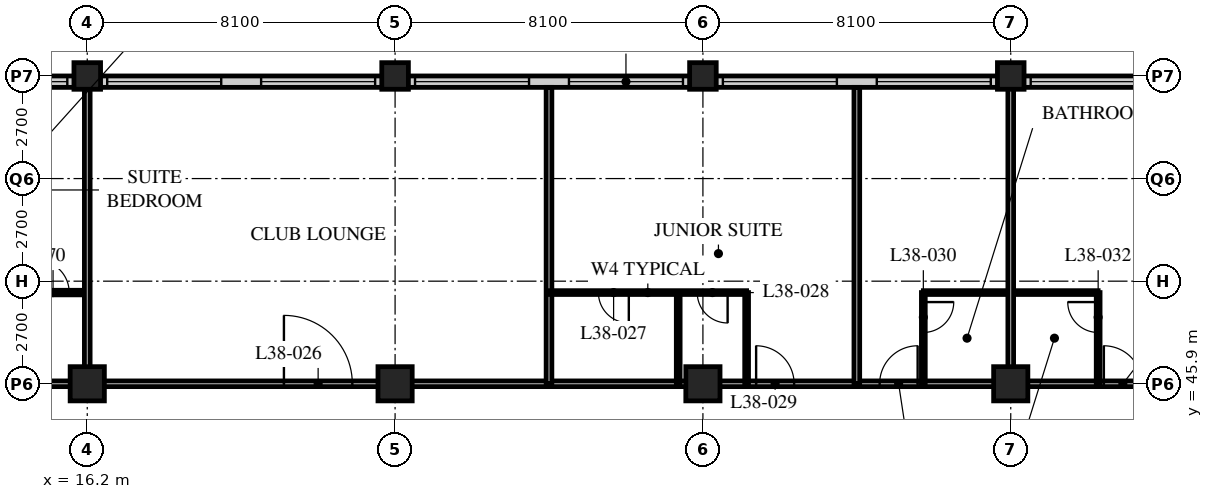
"""IFC4 building model, lengths in metres.
Left out: names, types, materials, properties, quantities, classifications, styles, units other than length and angle.
Written with IfcOpenShell. Run it as: python <this file> out.ifc"""

import sys

from ifc_helpers import new_model, si_unit, direction, frame, frame_2d, origin, origin_2d, place, context, subcontext, project, spatial, rectangle, hollow_rectangle, extrude, element, fill, save


model = new_model("IFC4")
c1 = context("Model", 3, precision=1e-05, world=origin(), true_north=direction((0.0, 1.0)))
c2 = subcontext(c1, "Body", "Model", "MODEL_VIEW")
j1 = project(units=[si_unit("LENGTHUNIT", "METRE"), si_unit("PLANEANGLEUNIT", "RADIAN")], contexts=[c1])
p1 = place(None, origin())
s1 = spatial("IfcSite", under=j1, at=p1, CompositionType="ELEMENT")
p2 = place(p1, origin())
s2 = spatial("IfcBuilding", under=s1, at=p2, CompositionType="ELEMENT")
p3 = place(p2, frame((0.0, 0.0, 147.6)))
s3 = spatial("IfcBuildingStorey", under=s2, at=p3, CompositionType="ELEMENT", Elevation=147.6)
p4 = place(p3, frame((16.2, 45.9, 0.0), z_axis=(0.0, 0.0, 1.0), x_axis=(1.0, 0.0, 0.0)))
e1 = element("IfcColumn", 1, at=p4, inside=s3, PredefinedType="COLUMN", context=c2, shape_type="SweptSolid", body=[
    extrude(hollow_rectangle(XDim=0.9, YDim=0.9, WallThickness=0.1, at=origin_2d()), origin(), (0.0, 0.0, 1.0), 3.4),
])
p5 = place(p3, frame((16.2, 54.0, 0.0), z_axis=(0.0, 0.0, 1.0), x_axis=(1.0, 0.0, 0.0)))
e2 = element("IfcColumn", 2, at=p5, inside=s3, PredefinedType="COLUMN", context=c2, shape_type="SweptSolid", body=[
    extrude(hollow_rectangle(XDim=0.7, YDim=0.7, WallThickness=0.07, at=origin_2d()), origin(), (0.0, 0.0, 1.0), 3.4),
])
p6 = place(p3, frame((24.3, 45.9, 0.0), z_axis=(0.0, 0.0, 1.0), x_axis=(1.0, 0.0, 0.0)))
e3 = element("IfcColumn", 3, at=p6, inside=s3, PredefinedType="COLUMN", context=c2, shape_type="SweptSolid", body=[
    extrude(hollow_rectangle(XDim=0.9, YDim=0.9, WallThickness=0.1, at=origin_2d()), origin(), (0.0, 0.0, 1.0), 3.4),
])
p7 = place(p3, frame((24.3, 54.0, 0.0), z_axis=(0.0, 0.0, 1.0), x_axis=(1.0, 0.0, 0.0)))
e4 = element("IfcColumn", 4, at=p7, inside=s3, PredefinedType="COLUMN", context=c2, shape_type="SweptSolid", body=[
    extrude(hollow_rectangle(XDim=0.7, YDim=0.7, WallThickness=0.07, at=origin_2d()), origin(), (0.0, 0.0, 1.0), 3.4),
])
p8 = place(p3, frame((32.4, 45.9, 0.0), z_axis=(0.0, 0.0, 1.0), x_axis=(1.0, 0.0, 0.0)))
e5 = element("IfcColumn", 5, at=p8, inside=s3, PredefinedType="COLUMN", context=c2, shape_type="SweptSolid", body=[
    extrude(hollow_rectangle(XDim=0.9, YDim=0.9, WallThickness=0.1, at=origin_2d()), origin(), (0.0, 0.0, 1.0), 3.4),
])
p9 = place(p3, frame((32.4, 54.0, 0.0), z_axis=(0.0, 0.0, 1.0), x_axis=(1.0, 0.0, 0.0)))
e6 = element("IfcColumn", 6, at=p9, inside=s3, PredefinedType="COLUMN", context=c2, shape_type="SweptSolid", body=[
    extrude(hollow_rectangle(XDim=0.7, YDim=0.7, WallThickness=0.07, at=origin_2d()), origin(), (0.0, 0.0, 1.0), 3.4),
])
p10 = place(p3, frame((40.5, 45.9, 0.0), z_axis=(0.0, 0.0, 1.0), x_axis=(1.0, 0.0, 0.0)))
e7 = element("IfcColumn", 7, at=p10, inside=s3, PredefinedType="COLUMN", context=c2, shape_type="SweptSolid", body=[
    extrude(hollow_rectangle(XDim=0.9, YDim=0.9, WallThickness=0.1, at=origin_2d()), origin(), (0.0, 0.0, 1.0), 3.4),
])
p11 = place(p3, frame((40.5, 54.0, 0.0), z_axis=(0.0, 0.0, 1.0), x_axis=(1.0, 0.0, 0.0)))
e8 = element("IfcColumn", 8, at=p11, inside=s3, PredefinedType="COLUMN", context=c2, shape_type="SweptSolid", body=[
    extrude(hollow_rectangle(XDim=0.7, YDim=0.7, WallThickness=0.07, at=origin_2d()), origin(), (0.0, 0.0, 1.0), 3.4),
])
p12 = place(p3, frame((48.3, 53.85, 0.0), z_axis=(0.0, 0.0, 1.0), x_axis=(-1.0, 0.0, 0.0)))
e9 = element("IfcWall", 9, at=p12, inside=s3, PredefinedType="SOLIDWALL", context=c2, shape_type="SweptSolid", body=[
    extrude(rectangle(XDim=40.2, YDim=0.3, at=frame_2d((20.1, 0.0))), origin(), (0.0, 0.0, 1.0), 3.19),
])
p13 = place(p12, frame((0.225, 0.0, 0.9)))
e10 = element("IfcOpeningElement", 10, at=p13, cuts=e9, PredefinedType="OPENING", context=c2, shape_type="SweptSolid", body=[
    extrude(rectangle(XDim=3.0, YDim=1.4, at=frame_2d((1.5, 0.7))), frame((0.0, 0.16, 0.0), z_axis=(0.0, -1.0, 0.0), x_axis=(1.0, 0.0, 0.0)), (0.0, 0.0, 1.0), 0.32),
])
p14 = place(p12, frame((4.275, 0.0, 0.9)))
e11 = element("IfcOpeningElement", 11, at=p14, cuts=e9, PredefinedType="OPENING", context=c2, shape_type="SweptSolid", body=[
    extrude(rectangle(XDim=3.0, YDim=1.4, at=frame_2d((1.5, 0.7))), frame((0.0, 0.16, 0.0), z_axis=(0.0, -1.0, 0.0), x_axis=(1.0, 0.0, 0.0)), (0.0, 0.0, 1.0), 0.32),
])
p15 = place(p12, frame((8.325, 0.0, 0.9)))
e12 = element("IfcOpeningElement", 12, at=p15, cuts=e9, PredefinedType="OPENING", context=c2, shape_type="SweptSolid", body=[
    extrude(rectangle(XDim=3.0, YDim=1.4, at=frame_2d((1.5, 0.7))), frame((0.0, 0.16, 0.0), z_axis=(0.0, -1.0, 0.0), x_axis=(1.0, 0.0, 0.0)), (0.0, 0.0, 1.0), 0.32),
])
p16 = place(p12, frame((12.375, 0.0, 0.9)))
e13 = element("IfcOpeningElement", 13, at=p16, cuts=e9, PredefinedType="OPENING", context=c2, shape_type="SweptSolid", body=[
    extrude(rectangle(XDim=3.0, YDim=1.4, at=frame_2d((1.5, 0.7))), frame((0.0, 0.16, 0.0), z_axis=(0.0, -1.0, 0.0), x_axis=(1.0, 0.0, 0.0)), (0.0, 0.0, 1.0), 0.32),
])
p17 = place(p12, frame((16.425, 0.0, 0.9)))
e14 = element("IfcOpeningElement", 14, at=p17, cuts=e9, PredefinedType="OPENING", context=c2, shape_type="SweptSolid", body=[
    extrude(rectangle(XDim=3.0, YDim=1.4, at=frame_2d((1.5, 0.7))), frame((0.0, 0.16, 0.0), z_axis=(0.0, -1.0, 0.0), x_axis=(1.0, 0.0, 0.0)), (0.0, 0.0, 1.0), 0.32),
])
p18 = place(p12, frame((20.475, 0.0, 0.9)))
e15 = element("IfcOpeningElement", 15, at=p18, cuts=e9, PredefinedType="OPENING", context=c2, shape_type="SweptSolid", body=[
    extrude(rectangle(XDim=3.0, YDim=1.4, at=frame_2d((1.5, 0.7))), frame((0.0, 0.16, 0.0), z_axis=(0.0, -1.0, 0.0), x_axis=(1.0, 0.0, 0.0)), (0.0, 0.0, 1.0), 0.32),
])
p19 = place(p12, frame((24.525, 0.0, 0.9)))
e16 = element("IfcOpeningElement", 16, at=p19, cuts=e9, PredefinedType="OPENING", context=c2, shape_type="SweptSolid", body=[
    extrude(rectangle(XDim=3.0, YDim=1.4, at=frame_2d((1.5, 0.7))), frame((0.0, 0.16, 0.0), z_axis=(0.0, -1.0, 0.0), x_axis=(1.0, 0.0, 0.0)), (0.0, 0.0, 1.0), 0.32),
])
p20 = place(p12, frame((28.575, 0.0, 0.9)))
e17 = element("IfcOpeningElement", 17, at=p20, cuts=e9, PredefinedType="OPENING", context=c2, shape_type="SweptSolid", body=[
    extrude(rectangle(XDim=3.0, YDim=1.4, at=frame_2d((1.5, 0.7))), frame((0.0, 0.16, 0.0), z_axis=(0.0, -1.0, 0.0), x_axis=(1.0, 0.0, 0.0)), (0.0, 0.0, 1.0), 0.32),
])
p21 = place(p12, frame((32.625, 0.0, 0.9)))
e18 = element("IfcOpeningElement", 18, at=p21, cuts=e9, PredefinedType="OPENING", context=c2, shape_type="SweptSolid", body=[
    extrude(rectangle(XDim=3.0, YDim=1.4, at=frame_2d((1.5, 0.7))), frame((0.0, 0.16, 0.0), z_axis=(0.0, -1.0, 0.0), x_axis=(1.0, 0.0, 0.0)), (0.0, 0.0, 1.0), 0.32),
])
p22 = place(p12, frame((36.675, 0.0, 0.9)))
e19 = element("IfcOpeningElement", 19, at=p22, cuts=e9, PredefinedType="OPENING", context=c2, shape_type="SweptSolid", body=[
    extrude(rectangle(XDim=3.0, YDim=1.4, at=frame_2d((1.5, 0.7))), frame((0.0, 0.16, 0.0), z_axis=(0.0, -1.0, 0.0), x_axis=(1.0, 0.0, 0.0)), (0.0, 0.0, 1.0), 0.32),
])
p23 = place(p3, frame((12.15, 45.9, 0.0), z_axis=(0.0, 0.0, 1.0), x_axis=(1.0, 0.0, 0.0)))
e20 = element("IfcWall", 20, at=p23, inside=s3, PredefinedType="PARTITIONING", context=c2, shape_type="SweptSolid", body=[
    extrude(rectangle(XDim=36.45, YDim=0.15, at=frame_2d((18.225, 0.0))), origin(), (0.0, 0.0, 1.0), 2.42),
])
p24 = place(p23, frame((9.225, 0.0, 0.0)))
e21 = element("IfcOpeningElement", 21, at=p24, cuts=e20, PredefinedType="OPENING", context=c2, shape_type="SweptSolid", body=[
    extrude(rectangle(XDim=1.8, YDim=2.4, at=frame_2d((0.9, 1.2))), frame((0.0, 0.085, 0.0), z_axis=(0.0, -1.0, 0.0), x_axis=(1.0, 0.0, 0.0)), (0.0, 0.0, 1.0), 0.17),
])
p25 = place(p23, frame((21.65, 0.0, 0.0)))
e22 = element("IfcOpeningElement", 22, at=p25, cuts=e20, PredefinedType="OPENING", context=c2, shape_type="SweptSolid", body=[
    extrude(rectangle(XDim=1.0, YDim=2.1, at=frame_2d((0.5, 1.05))), frame((0.0, 0.085, 0.0), z_axis=(0.0, -1.0, 0.0), x_axis=(1.0, 0.0, 0.0)), (0.0, 0.0, 1.0), 0.17),
])
p26 = place(p23, frame((24.9, 0.0, 0.0)))
e23 = element("IfcOpeningElement", 23, at=p26, cuts=e20, PredefinedType="OPENING", context=c2, shape_type="SweptSolid", body=[
    extrude(rectangle(XDim=1.0, YDim=2.1, at=frame_2d((0.5, 1.05))), frame((0.0, 0.085, 0.0), z_axis=(0.0, -1.0, 0.0), x_axis=(1.0, 0.0, 0.0)), (0.0, 0.0, 1.0), 0.17),
])
p27 = place(p23, frame((30.8, 0.0, 0.0)))
e24 = element("IfcOpeningElement", 24, at=p27, cuts=e20, PredefinedType="OPENING", context=c2, shape_type="SweptSolid", body=[
    extrude(rectangle(XDim=1.0, YDim=2.1, at=frame_2d((0.5, 1.05))), frame((0.0, 0.085, 0.0), z_axis=(0.0, -1.0, 0.0), x_axis=(1.0, 0.0, 0.0)), (0.0, 0.0, 1.0), 0.17),
])
p28 = place(p23, frame((32.825, 0.0, 0.0)))
e25 = element("IfcOpeningElement", 25, at=p28, cuts=e20, PredefinedType="OPENING", context=c2, shape_type="SweptSolid", body=[
    extrude(rectangle(XDim=1.0, YDim=2.1, at=frame_2d((0.5, 1.05))), frame((0.0, 0.085, 0.0), z_axis=(0.0, -1.0, 0.0), x_axis=(1.0, 0.0, 0.0)), (0.0, 0.0, 1.0), 0.17),
])
p29 = place(p23, frame((1.525, 0.0, 0.0)))
e26 = element("IfcOpeningElement", 26, at=p29, cuts=e20, PredefinedType="OPENING", context=c2, shape_type="SweptSolid", body=[
    extrude(rectangle(XDim=1.0, YDim=2.1, at=frame_2d((0.5, 1.05))), frame((0.0, 0.085, 0.0), z_axis=(0.0, -1.0, 0.0), x_axis=(1.0, 0.0, 0.0)), (0.0, 0.0, 1.0), 0.17),
])
p30 = place(p3, frame((28.35, 45.9, 0.0), z_axis=(0.0, 0.0, 1.0), x_axis=(0.0, 1.0, 0.0)))
e27 = element("IfcWall", 27, at=p30, inside=s3, PredefinedType="PARTITIONING", context=c2, shape_type="SweptSolid", body=[
    extrude(rectangle(XDim=7.8, YDim=0.15, at=frame_2d((3.9, 0.0))), origin(), (0.0, 0.0, 1.0), 3.19),
])
p31 = place(p3, frame((28.35, 48.3, 0.0), z_axis=(0.0, 0.0, 1.0), x_axis=(1.0, 0.0, 0.0)))
e28 = element("IfcWall", 28, at=p31, inside=s3, PredefinedType="PARTITIONING", context=c2, shape_type="SweptSolid", body=[
    extrude(rectangle(XDim=5.2, YDim=0.1, at=frame_2d((2.6, 0.0))), origin(), (0.0, 0.0, 1.0), 3.19),
])
p32 = place(p31, frame((1.3, 0.0, 0.0)))
e29 = element("IfcOpeningElement", 29, at=p32, cuts=e28, PredefinedType="OPENING", context=c2, shape_type="SweptSolid", body=[
    extrude(rectangle(XDim=0.8, YDim=2.1, at=frame_2d((0.4, 1.05))), frame((0.0, 0.06, 0.0), z_axis=(0.0, -1.0, 0.0), x_axis=(1.0, 0.0, 0.0)), (0.0, 0.0, 1.0), 0.12),
])
p33 = place(p31, frame((3.9, 0.0, 0.0)))
e30 = element("IfcOpeningElement", 30, at=p33, cuts=e28, PredefinedType="OPENING", context=c2, shape_type="SweptSolid", body=[
    extrude(rectangle(XDim=0.8, YDim=2.1, at=frame_2d((0.4, 1.05))), frame((0.0, 0.06, 0.0), z_axis=(0.0, -1.0, 0.0), x_axis=(1.0, 0.0, 0.0)), (0.0, 0.0, 1.0), 0.12),
])
for number, where, z_axis, x_axis in (
    (31, (31.75, 45.9, 0.0), (0.0, 0.0, 1.0), (0.0, 1.0, 0.0)),
    (32, (33.55, 45.9, 0.0), (0.0, 0.0, 1.0), (0.0, 1.0, 0.0)),
):
    element("IfcWall", number, at=place(p3, frame(where, z_axis=z_axis, x_axis=x_axis)), inside=s3, PredefinedType="PARTITIONING", context=c2, shape_type="SweptSolid", body=[
        extrude(rectangle(XDim=2.4, YDim=0.1, at=frame_2d((1.2, 0.0))), origin(), (0.0, 0.0, 1.0), 3.19),
    ])
p34 = place(p3, frame((36.45, 45.9, 0.0), z_axis=(0.0, 0.0, 1.0), x_axis=(0.0, 1.0, 0.0)))
e33 = element("IfcWall", 33, at=p34, inside=s3, PredefinedType="PARTITIONING", context=c2, shape_type="SweptSolid", body=[
    extrude(rectangle(XDim=7.8, YDim=0.15, at=frame_2d((3.9, 0.0))), origin(), (0.0, 0.0, 1.0), 3.19),
])
p35 = place(p3, frame((38.2, 48.3, 0.0), z_axis=(0.0, 0.0, 1.0), x_axis=(1.0, 0.0, 0.0)))
e34 = element("IfcWall", 34, at=p35, inside=s3, PredefinedType="PARTITIONING", context=c2, shape_type="SweptSolid", body=[
    extrude(rectangle(XDim=4.6, YDim=0.1, at=frame_2d((2.3, 0.0))), origin(), (0.0, 0.0, 1.0), 3.19),
])
p36 = place(p3, frame((38.2, 45.9, 0.0), z_axis=(0.0, 0.0, 1.0), x_axis=(0.0, 1.0, 0.0)))
e35 = element("IfcWall", 35, at=p36, inside=s3, PredefinedType="PARTITIONING", context=c2, shape_type="SweptSolid", body=[
    extrude(rectangle(XDim=2.4, YDim=0.1, at=frame_2d((1.2, 0.0))), origin(), (0.0, 0.0, 1.0), 3.19),
])
p37 = place(p36, frame((1.35, 0.0, 0.0)))
e36 = element("IfcOpeningElement", 36, at=p37, cuts=e35, PredefinedType="OPENING", context=c2, shape_type="SweptSolid", body=[
    extrude(rectangle(XDim=0.8, YDim=2.1, at=frame_2d((0.4, 1.05))), frame((0.0, 0.06, 0.0), z_axis=(0.0, -1.0, 0.0), x_axis=(1.0, 0.0, 0.0)), (0.0, 0.0, 1.0), 0.12),
])
p38 = place(p3, frame((40.5, 45.9, 0.0), z_axis=(0.0, 0.0, 1.0), x_axis=(0.0, 1.0, 0.0)))
e37 = element("IfcWall", 37, at=p38, inside=s3, PredefinedType="PARTITIONING", context=c2, shape_type="SweptSolid", body=[
    extrude(rectangle(XDim=7.8, YDim=0.15, at=frame_2d((3.9, 0.0))), origin(), (0.0, 0.0, 1.0), 2.42),
])
p39 = place(p3, frame((42.8, 45.9, 0.0), z_axis=(0.0, 0.0, 1.0), x_axis=(0.0, 1.0, 0.0)))
e38 = element("IfcWall", 38, at=p39, inside=s3, PredefinedType="PARTITIONING", context=c2, shape_type="SweptSolid", body=[
    extrude(rectangle(XDim=2.4, YDim=0.1, at=frame_2d((1.2, 0.0))), origin(), (0.0, 0.0, 1.0), 3.19),
])
p40 = place(p39, frame((1.35, 0.0, 0.0)))
e39 = element("IfcOpeningElement", 39, at=p40, cuts=e38, PredefinedType="OPENING", context=c2, shape_type="SweptSolid", body=[
    extrude(rectangle(XDim=0.8, YDim=2.1, at=frame_2d((0.4, 1.05))), frame((0.0, 0.06, 0.0), z_axis=(0.0, -1.0, 0.0), x_axis=(1.0, 0.0, 0.0)), (0.0, 0.0, 1.0), 0.12),
])
p41 = place(p3, frame((8.15, 48.3, 0.0), z_axis=(0.0, 0.0, 1.0), x_axis=(1.0, 0.0, 0.0)))
e40 = element("IfcWall", 40, at=p41, inside=s3, PredefinedType="PARTITIONING", context=c2, shape_type="SweptSolid", body=[
    extrude(rectangle(XDim=8.05, YDim=0.12, at=frame_2d((4.025, 0.0))), origin(), (0.0, 0.0, 1.0), 3.19),
])
p42 = place(p41, frame((6.725, 0.0, 0.0)))
e41 = element("IfcOpeningElement", 41, at=p42, cuts=e40, PredefinedType="OPENING", context=c2, shape_type="SweptSolid", body=[
    extrude(rectangle(XDim=0.85, YDim=2.1, at=frame_2d((0.425, 1.05))), frame((0.0, 0.07, 0.0), z_axis=(0.0, -1.0, 0.0), x_axis=(1.0, 0.0, 0.0)), (0.0, 0.0, 1.0), 0.14),
])
p43 = place(p41, frame((2.875, 0.0, 0.0)))
e42 = element("IfcOpeningElement", 42, at=p43, cuts=e40, PredefinedType="OPENING", context=c2, shape_type="SweptSolid", body=[
    extrude(rectangle(XDim=0.85, YDim=2.1, at=frame_2d((0.425, 1.05))), frame((0.0, 0.07, 0.0), z_axis=(0.0, -1.0, 0.0), x_axis=(1.0, 0.0, 0.0)), (0.0, 0.0, 1.0), 0.14),
])
p44 = place(p3, frame((16.2, 45.9, 0.0), z_axis=(0.0, 0.0, 1.0), x_axis=(0.0, 1.0, 0.0)))
e43 = element("IfcWall", 43, at=p44, inside=s3, PredefinedType="PARTITIONING", context=c2, shape_type="SweptSolid", body=[
    extrude(rectangle(XDim=7.8, YDim=0.15, at=frame_2d((3.9, 0.0))), origin(), (0.0, 0.0, 1.0), 2.42),
])
p45 = place(p14, origin())
e44 = element("IfcWindow", 44, at=p45, inside=s3, PartitioningType="SINGLE_PANEL", PredefinedType="WINDOW", context=c2, shape_type="SweptSolid", body=[
    extrude(rectangle(XDim=3.0, YDim=1.4, at=frame_2d((1.5, 0.7))), frame((0.0, 0.03, 0.0), z_axis=(0.0, -1.0, 0.0), x_axis=(1.0, 0.0, 0.0)), (0.0, 0.0, 1.0), 0.06),
])
fill(e11, e44)
p46 = place(p15, origin())
e45 = element("IfcWindow", 45, at=p46, inside=s3, PartitioningType="SINGLE_PANEL", PredefinedType="WINDOW", context=c2, shape_type="SweptSolid", body=[
    extrude(rectangle(XDim=3.0, YDim=1.4, at=frame_2d((1.5, 0.7))), frame((0.0, 0.03, 0.0), z_axis=(0.0, -1.0, 0.0), x_axis=(1.0, 0.0, 0.0)), (0.0, 0.0, 1.0), 0.06),
])
fill(e12, e45)
p47 = place(p16, origin())
e46 = element("IfcWindow", 46, at=p47, inside=s3, PartitioningType="SINGLE_PANEL", PredefinedType="WINDOW", context=c2, shape_type="SweptSolid", body=[
    extrude(rectangle(XDim=3.0, YDim=1.4, at=frame_2d((1.5, 0.7))), frame((0.0, 0.03, 0.0), z_axis=(0.0, -1.0, 0.0), x_axis=(1.0, 0.0, 0.0)), (0.0, 0.0, 1.0), 0.06),
])
fill(e13, e46)
p48 = place(p17, origin())
e47 = element("IfcWindow", 47, at=p48, inside=s3, PartitioningType="SINGLE_PANEL", PredefinedType="WINDOW", context=c2, shape_type="SweptSolid", body=[
    extrude(rectangle(XDim=3.0, YDim=1.4, at=frame_2d((1.5, 0.7))), frame((0.0, 0.03, 0.0), z_axis=(0.0, -1.0, 0.0), x_axis=(1.0, 0.0, 0.0)), (0.0, 0.0, 1.0), 0.06),
])
fill(e14, e47)
p49 = place(p18, origin())
e48 = element("IfcWindow", 48, at=p49, inside=s3, PartitioningType="SINGLE_PANEL", PredefinedType="WINDOW", context=c2, shape_type="SweptSolid", body=[
    extrude(rectangle(XDim=3.0, YDim=1.4, at=frame_2d((1.5, 0.7))), frame((0.0, 0.03, 0.0), z_axis=(0.0, -1.0, 0.0), x_axis=(1.0, 0.0, 0.0)), (0.0, 0.0, 1.0), 0.06),
])
fill(e15, e48)
p50 = place(p19, origin())
e49 = element("IfcWindow", 49, at=p50, inside=s3, PartitioningType="SINGLE_PANEL", PredefinedType="WINDOW", context=c2, shape_type="SweptSolid", body=[
    extrude(rectangle(XDim=3.0, YDim=1.4, at=frame_2d((1.5, 0.7))), frame((0.0, 0.03, 0.0), z_axis=(0.0, -1.0, 0.0), x_axis=(1.0, 0.0, 0.0)), (0.0, 0.0, 1.0), 0.06),
])
fill(e16, e49)
p51 = place(p20, origin())
e50 = element("IfcWindow", 50, at=p51, inside=s3, PartitioningType="SINGLE_PANEL", PredefinedType="WINDOW", context=c2, shape_type="SweptSolid", body=[
    extrude(rectangle(XDim=3.0, YDim=1.4, at=frame_2d((1.5, 0.7))), frame((0.0, 0.03, 0.0), z_axis=(0.0, -1.0, 0.0), x_axis=(1.0, 0.0, 0.0)), (0.0, 0.0, 1.0), 0.06),
])
fill(e17, e50)
p52 = place(p21, origin())
e51 = element("IfcWindow", 51, at=p52, inside=s3, PartitioningType="SINGLE_PANEL", PredefinedType="WINDOW", context=c2, shape_type="SweptSolid", body=[
    extrude(rectangle(XDim=3.0, YDim=1.4, at=frame_2d((1.5, 0.7))), frame((0.0, 0.03, 0.0), z_axis=(0.0, -1.0, 0.0), x_axis=(1.0, 0.0, 0.0)), (0.0, 0.0, 1.0), 0.06),
])
fill(e18, e51)
p53 = place(p24, origin())
e52 = element("IfcDoor", 52, at=p53, inside=s3, OperationType="DOUBLE_DOOR_SINGLE_SWING", PredefinedType="DOOR", context=c2, shape_type="SweptSolid", body=[
    extrude(rectangle(XDim=1.8, YDim=2.4, at=frame_2d((0.9, 1.2))), frame((0.0, 0.025, 0.0), z_axis=(0.0, -1.0, 0.0), x_axis=(1.0, 0.0, 0.0)), (0.0, 0.0, 1.0), 0.05),
])
fill(e21, e52)
p54 = place(p32, origin())
e53 = element("IfcDoor", 53, at=p54, inside=s3, OperationType="SINGLE_SWING_LEFT", PredefinedType="DOOR", context=c2, shape_type="SweptSolid", body=[
    extrude(rectangle(XDim=0.8, YDim=2.1, at=frame_2d((0.4, 1.05))), frame((0.0, 0.025, 0.0), z_axis=(0.0, -1.0, 0.0), x_axis=(1.0, 0.0, 0.0)), (0.0, 0.0, 1.0), 0.05),
])
fill(e29, e53)
p55 = place(p33, origin())
e54 = element("IfcDoor", 54, at=p55, inside=s3, OperationType="SINGLE_SWING_LEFT", PredefinedType="DOOR", context=c2, shape_type="SweptSolid", body=[
    extrude(rectangle(XDim=0.8, YDim=2.1, at=frame_2d((0.4, 1.05))), frame((0.0, 0.025, 0.0), z_axis=(0.0, -1.0, 0.0), x_axis=(1.0, 0.0, 0.0)), (0.0, 0.0, 1.0), 0.05),
])
fill(e30, e54)
p56 = place(p25, origin())
e55 = element("IfcDoor", 55, at=p56, inside=s3, OperationType="SINGLE_SWING_LEFT", PredefinedType="DOOR", context=c2, shape_type="SweptSolid", body=[
    extrude(rectangle(XDim=1.0, YDim=2.1, at=frame_2d((0.5, 1.05))), frame((0.0, 0.025, 0.0), z_axis=(0.0, -1.0, 0.0), x_axis=(1.0, 0.0, 0.0)), (0.0, 0.0, 1.0), 0.05),
])
fill(e22, e55)
p57 = place(p37, origin())
e56 = element("IfcDoor", 56, at=p57, inside=s3, OperationType="SINGLE_SWING_LEFT", PredefinedType="DOOR", context=c2, shape_type="SweptSolid", body=[
    extrude(rectangle(XDim=0.8, YDim=2.1, at=frame_2d((0.4, 1.05))), frame((0.0, 0.025, 0.0), z_axis=(0.0, -1.0, 0.0), x_axis=(1.0, 0.0, 0.0)), (0.0, 0.0, 1.0), 0.05),
])
fill(e36, e56)
p58 = place(p26, origin())
e57 = element("IfcDoor", 57, at=p58, inside=s3, OperationType="SINGLE_SWING_RIGHT", PredefinedType="DOOR", context=c2, shape_type="SweptSolid", body=[
    extrude(rectangle(XDim=1.0, YDim=2.1, at=frame_2d((0.5, 1.05))), frame((0.0, 0.025, 0.0), z_axis=(0.0, -1.0, 0.0), x_axis=(1.0, 0.0, 0.0)), (0.0, 0.0, 1.0), 0.05),
])
fill(e23, e57)
p59 = place(p40, origin())
e58 = element("IfcDoor", 58, at=p59, inside=s3, OperationType="SINGLE_SWING_RIGHT", PredefinedType="DOOR", context=c2, shape_type="SweptSolid", body=[
    extrude(rectangle(XDim=0.8, YDim=2.1, at=frame_2d((0.4, 1.05))), frame((0.0, 0.025, 0.0), z_axis=(0.0, -1.0, 0.0), x_axis=(1.0, 0.0, 0.0)), (0.0, 0.0, 1.0), 0.05),
])
fill(e39, e58)
p60 = place(p27, origin())
e59 = element("IfcDoor", 59, at=p60, inside=s3, OperationType="SINGLE_SWING_LEFT", PredefinedType="DOOR", context=c2, shape_type="SweptSolid", body=[
    extrude(rectangle(XDim=1.0, YDim=2.1, at=frame_2d((0.5, 1.05))), frame((0.0, 0.025, 0.0), z_axis=(0.0, -1.0, 0.0), x_axis=(1.0, 0.0, 0.0)), (0.0, 0.0, 1.0), 0.05),
])
fill(e24, e59)
p61 = place(p42, origin())
e60 = element("IfcDoor", 60, at=p61, inside=s3, OperationType="SINGLE_SWING_LEFT", PredefinedType="DOOR", context=c2, shape_type="SweptSolid", body=[
    extrude(rectangle(XDim=0.85, YDim=2.1, at=frame_2d((0.425, 1.05))), frame((0.0, 0.025, 0.0), z_axis=(0.0, -1.0, 0.0), x_axis=(1.0, 0.0, 0.0)), (0.0, 0.0, 1.0), 0.05),
])
fill(e41, e60)
save(model, sys.argv[1])
